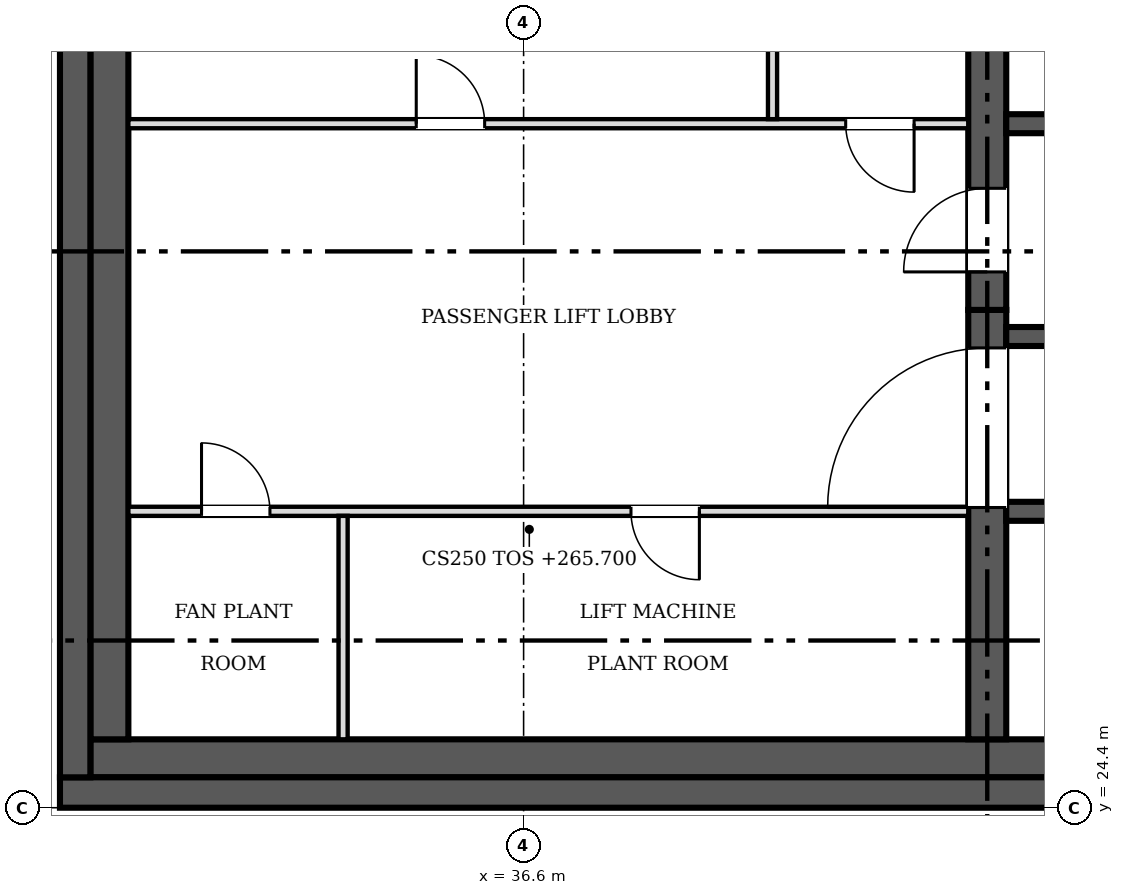
"""IFC4 building model, lengths in metres.
Left out: names, types, materials, properties, quantities, classifications, styles, units other than length and angle.
Written with IfcOpenShell. Run it as: python <this file> out.ifc"""

import sys

from ifc_helpers import new_model, si_unit, direction, frame, frame_2d, origin, place, context, subcontext, project, spatial, rectangle, extrude, source, transform, mapped, element, fill, save


model = new_model("IFC4")
c1 = context("Model", 3, precision=1e-05, world=origin(), true_north=direction((0.0, 1.0)))
c2 = subcontext(c1, "Body", "Model", "MODEL_VIEW")
j1 = project(units=[si_unit("LENGTHUNIT", "METRE"), si_unit("PLANEANGLEUNIT", "RADIAN")], contexts=[c1])
p1 = place(None, origin())
s1 = spatial("IfcSite", under=j1, at=p1, CompositionType="ELEMENT")
p2 = place(p1, origin())
s2 = spatial("IfcBuilding", under=s1, at=p2, CompositionType="ELEMENT")
p3 = place(p2, frame((0.0, 0.0, 265.7)))
s3 = spatial("IfcBuildingStorey", under=s2, at=p3, CompositionType="ELEMENT", Elevation=265.7)
p4 = place(p3, frame((54.9, 24.6, 0.0), z_axis=(0.0, 0.0, 1.0), x_axis=(-1.0, 0.0, 0.0)))
e1 = element("IfcWall", 1, at=p4, inside=s3, PredefinedType="SHEAR", context=c2, shape_type="SweptSolid", body=[
    extrude(rectangle(XDim=24.4, YDim=0.4, at=frame_2d((12.2, 0.0))), origin(), (0.0, 0.0, 1.0), 4.2),
])
p5 = place(p3, frame((30.7, 24.8, 0.0), z_axis=(0.0, 0.0, 1.0), x_axis=(0.0, 1.0, 0.0)))
e2 = element("IfcWall", 2, at=p5, inside=s3, PredefinedType="SHEAR", context=c2, shape_type="SweptSolid", body=[
    extrude(rectangle(XDim=23.6, YDim=0.4, at=frame_2d((11.8, 0.0))), origin(), (0.0, 0.0, 1.0), 4.2),
])
p6 = place(p3, frame((30.9, 25.05, 0.0), z_axis=(0.0, 0.0, 1.0), x_axis=(1.0, 0.0, 0.0)))
e3 = element("IfcWall", 3, at=p6, inside=s3, PredefinedType="SOLIDWALL", context=c2, shape_type="SweptSolid", body=[
    extrude(rectangle(XDim=23.6, YDim=0.5, at=frame_2d((11.8, 0.0))), origin(), (0.0, 0.0, 1.0), 4.2),
])
p7 = place(p3, frame((31.15, 25.3, 0.0), z_axis=(0.0, 0.0, 1.0), x_axis=(0.0, 1.0, 0.0)))
e4 = element("IfcWall", 4, at=p7, inside=s3, PredefinedType="SOLIDWALL", context=c2, shape_type="SweptSolid", body=[
    extrude(rectangle(XDim=22.6, YDim=0.5, at=frame_2d((11.3, 0.0))), origin(), (0.0, 0.0, 1.0), 4.2),
])
p8 = place(p3, frame((42.7, 25.3, 0.0), z_axis=(0.0, 0.0, 1.0), x_axis=(0.0, 1.0, 0.0)))
e5 = element("IfcWall", 5, at=p8, inside=s3, PredefinedType="SHEAR", context=c2, shape_type="SweptSolid", body=[
    extrude(rectangle(XDim=5.65, YDim=0.5, at=frame_2d((2.825, 0.0))), origin(), (0.0, 0.0, 1.0), 4.2),
])
m1 = source(origin(), c2, "Body", "SweptSolid", [
    extrude(rectangle(XDim=2.1, YDim=2.4, at=frame_2d((1.05, 1.2))), frame((0.0, 0.26, 0.0), z_axis=(0.0, -1.0, 0.0), x_axis=(1.0, 0.0, 0.0)), (0.0, 0.0, 1.0), 0.52),
])
p9 = place(p8, frame((3.05, 0.0, 0.0)))
e6 = element("IfcOpeningElement", 6, at=p9, cuts=e5, PredefinedType="OPENING", context=c2, shape_type="MappedRepresentation", body=[
    mapped(m1, transform((0.0, 0.0, 0.0), scale=1.0)),
])
p10 = place(p3, frame((42.7, 36.35, 0.0), z_axis=(0.0, 0.0, 1.0), x_axis=(0.0, -1.0, 0.0)))
e7 = element("IfcWall", 7, at=p10, inside=s3, PredefinedType="SHEAR", context=c2, shape_type="SweptSolid", body=[
    extrude(rectangle(XDim=5.4, YDim=0.5, at=frame_2d((2.7, 0.0))), origin(), (0.0, 0.0, 1.0), 4.2),
])
m2 = source(origin(), c2, "Body", "SweptSolid", [
    extrude(rectangle(XDim=1.1, YDim=2.1, at=frame_2d((0.55, 1.05))), frame((0.0, 0.26, 0.0), z_axis=(0.0, -1.0, 0.0), x_axis=(1.0, 0.0, 0.0)), (0.0, 0.0, 1.0), 0.52),
])
p11 = place(p10, frame((3.8, 0.0, 0.0)))
e8 = element("IfcOpeningElement", 8, at=p11, cuts=e7, PredefinedType="OPENING", context=c2, shape_type="MappedRepresentation", body=[
    mapped(m2, transform((0.0, 0.0, 0.0), scale=1.0)),
])
p12 = place(p3, frame((48.225, 33.4, 0.0), z_axis=(0.0, 0.0, 1.0), x_axis=(-1.0, 0.0, 0.0)))
e9 = element("IfcWall", 9, at=p12, inside=s3, PredefinedType="SOLIDWALL", context=c2, shape_type="SweptSolid", body=[
    extrude(rectangle(XDim=5.275, YDim=0.25, at=frame_2d((2.638, 0.0))), origin(), (0.0, 0.0, 1.0), 4.2),
])
m3 = source(origin(), c2, "Body", "SweptSolid", [
    extrude(rectangle(XDim=1.2, YDim=2.1, at=frame_2d((0.6, 1.05))), frame((0.0, 0.135, 0.0), z_axis=(0.0, -1.0, 0.0), x_axis=(1.0, 0.0, 0.0)), (0.0, 0.0, 1.0), 0.27),
])
p13 = place(p12, frame((3.512, 0.0, 0.0)))
e10 = element("IfcOpeningElement", 10, at=p13, cuts=e9, PredefinedType="OPENING", context=c2, shape_type="MappedRepresentation", body=[
    mapped(m3, transform((0.0, 0.0, 0.0), scale=1.0)),
])
p14 = place(p12, frame((0.688, 0.0, 0.0)))
e11 = element("IfcOpeningElement", 11, at=p14, cuts=e9, PredefinedType="OPENING", context=c2, shape_type="MappedRepresentation", body=[
    mapped(m3, transform((0.0, 0.0, 0.0), scale=1.0)),
])
p15 = place(p3, frame((42.95, 28.3, 0.0), z_axis=(0.0, 0.0, 1.0), x_axis=(1.0, 0.0, 0.0)))
e12 = element("IfcWall", 12, at=p15, inside=s3, PredefinedType="SOLIDWALL", context=c2, shape_type="SweptSolid", body=[
    extrude(rectangle(XDim=5.275, YDim=0.25, at=frame_2d((2.638, 0.0))), origin(), (0.0, 0.0, 1.0), 4.2),
])
m4 = source(origin(), c2, "Body", "SweptSolid", [
    extrude(rectangle(XDim=1.1, YDim=2.1, at=frame_2d((0.55, 1.05))), frame((0.0, 0.135, 0.0), z_axis=(0.0, -1.0, 0.0), x_axis=(1.0, 0.0, 0.0)), (0.0, 0.0, 1.0), 0.27),
])
p16 = place(p15, frame((0.613, 0.0, 0.0)))
e13 = element("IfcOpeningElement", 13, at=p16, cuts=e12, PredefinedType="OPENING", context=c2, shape_type="MappedRepresentation", body=[
    mapped(m4, transform((0.0, 0.0, 0.0), scale=1.0)),
])
p17 = place(p15, frame((3.438, 0.0, 0.0)))
e14 = element("IfcOpeningElement", 14, at=p17, cuts=e12, PredefinedType="OPENING", context=c2, shape_type="MappedRepresentation", body=[
    mapped(m4, transform((0.0, 0.0, 0.0), scale=1.0)),
])
p18 = place(p3, frame((42.95, 30.6, 0.0), z_axis=(0.0, 0.0, 1.0), x_axis=(1.0, 0.0, 0.0)))
e15 = element("IfcWall", 15, at=p18, inside=s3, PredefinedType="SOLIDWALL", context=c2, shape_type="SweptSolid", body=[
    extrude(rectangle(XDim=5.275, YDim=0.25, at=frame_2d((2.638, 0.0))), origin(), (0.0, 0.0, 1.0), 4.2),
])
p19 = place(p3, frame((42.45, 28.3, 0.0), z_axis=(0.0, 0.0, 1.0), x_axis=(-1.0, 0.0, 0.0)))
e16 = element("IfcWall", 16, at=p19, inside=s3, PredefinedType="PARTITIONING", context=c2, shape_type="SweptSolid", body=[
    extrude(rectangle(XDim=11.05, YDim=0.12, at=frame_2d((5.525, 0.0))), origin(), (0.0, 0.0, 1.0), 4.2),
])
m5 = source(origin(), c2, "Body", "SweptSolid", [
    extrude(rectangle(XDim=0.9, YDim=2.1, at=frame_2d((0.45, 1.05))), frame((0.0, 0.07, 0.0), z_axis=(0.0, -1.0, 0.0), x_axis=(1.0, 0.0, 0.0)), (0.0, 0.0, 1.0), 0.14),
])
p20 = place(p19, frame((9.188, 0.0, 0.0)))
e17 = element("IfcOpeningElement", 17, at=p20, cuts=e16, PredefinedType="OPENING", context=c2, shape_type="MappedRepresentation", body=[
    mapped(m5, transform((0.0, 0.0, 0.0), scale=1.0)),
])
p21 = place(p19, frame((3.538, 0.0, 0.0)))
e18 = element("IfcOpeningElement", 18, at=p21, cuts=e16, PredefinedType="OPENING", context=c2, shape_type="MappedRepresentation", body=[
    mapped(m5, transform((0.0, 0.0, 0.0), scale=1.0)),
])
p22 = place(p3, frame((31.4, 33.4, 0.0), z_axis=(0.0, 0.0, 1.0), x_axis=(1.0, 0.0, 0.0)))
e19 = element("IfcWall", 19, at=p22, inside=s3, PredefinedType="PARTITIONING", context=c2, shape_type="SweptSolid", body=[
    extrude(rectangle(XDim=11.05, YDim=0.12, at=frame_2d((5.525, 0.0))), origin(), (0.0, 0.0, 1.0), 4.2),
])
p23 = place(p22, frame((3.788, 0.0, 0.0)))
e20 = element("IfcOpeningElement", 20, at=p23, cuts=e19, PredefinedType="OPENING", context=c2, shape_type="MappedRepresentation", body=[
    mapped(m5, transform((0.0, 0.0, 0.0), scale=1.0)),
])
p24 = place(p22, frame((9.438, 0.0, 0.0)))
e21 = element("IfcOpeningElement", 21, at=p24, cuts=e19, PredefinedType="OPENING", context=c2, shape_type="MappedRepresentation", body=[
    mapped(m5, transform((0.0, 0.0, 0.0), scale=1.0)),
])
p25 = place(p3, frame((39.875, 33.46, 0.0), z_axis=(0.0, 0.0, 1.0), x_axis=(0.0, 1.0, 0.0)))
e22 = element("IfcWall", 22, at=p25, inside=s3, PredefinedType="PARTITIONING", context=c2, shape_type="SweptSolid", body=[
    extrude(rectangle(XDim=2.89, YDim=0.12, at=frame_2d((1.445, 0.0))), origin(), (0.0, 0.0, 1.0), 4.2),
])
p26 = place(p3, frame((34.225, 25.3, 0.0), z_axis=(0.0, 0.0, 1.0), x_axis=(0.0, 1.0, 0.0)))
e23 = element("IfcWall", 23, at=p26, inside=s3, PredefinedType="PARTITIONING", context=c2, shape_type="SweptSolid", body=[
    extrude(rectangle(XDim=2.94, YDim=0.12, at=frame_2d((1.47, 0.0))), origin(), (0.0, 0.0, 1.0), 4.2),
])
m6 = source(origin(), c2, "Body", "SweptSolid", [
    extrude(rectangle(XDim=2.1, YDim=2.4, at=frame_2d((1.05, 1.2))), frame((0.0, 0.025, 0.0), z_axis=(0.0, -1.0, 0.0), x_axis=(1.0, 0.0, 0.0)), (0.0, 0.0, 1.0), 0.05),
])
p27 = place(p9, origin())
e24 = element("IfcDoor", 24, at=p27, inside=s3, OperationType="DOUBLE_DOOR_SINGLE_SWING", PredefinedType="DOOR", context=c2, shape_type="MappedRepresentation", body=[
    mapped(m6, transform((0.0, 0.0, 0.0), scale=1.0)),
])
fill(e6, e24)
m7 = source(origin(), c2, "Body", "SweptSolid", [
    extrude(rectangle(XDim=1.1, YDim=2.1, at=frame_2d((0.55, 1.05))), frame((0.0, 0.025, 0.0), z_axis=(0.0, -1.0, 0.0), x_axis=(1.0, 0.0, 0.0)), (0.0, 0.0, 1.0), 0.05),
])
p28 = place(p11, origin())
e25 = element("IfcDoor", 25, at=p28, inside=s3, OperationType="SINGLE_SWING_RIGHT", PredefinedType="DOOR", context=c2, shape_type="MappedRepresentation", body=[
    mapped(m7, transform((0.0, 0.0, 0.0), scale=1.0)),
])
fill(e8, e25)
m8 = source(origin(), c2, "Body", "SweptSolid", [
    extrude(rectangle(XDim=0.9, YDim=2.1, at=frame_2d((0.45, 1.05))), frame((0.0, 0.025, 0.0), z_axis=(0.0, -1.0, 0.0), x_axis=(1.0, 0.0, 0.0)), (0.0, 0.0, 1.0), 0.05),
])
p29 = place(p20, origin())
e26 = element("IfcDoor", 26, at=p29, inside=s3, OperationType="SINGLE_SWING_RIGHT", PredefinedType="DOOR", context=c2, shape_type="MappedRepresentation", body=[
    mapped(m8, transform((0.0, 0.0, 0.0), scale=1.0)),
])
fill(e17, e26)
p30 = place(p21, origin())
e27 = element("IfcDoor", 27, at=p30, inside=s3, OperationType="SINGLE_SWING_LEFT", PredefinedType="DOOR", context=c2, shape_type="MappedRepresentation", body=[
    mapped(m8, transform((0.0, 0.0, 0.0), scale=1.0)),
])
fill(e18, e27)
p31 = place(p23, origin())
e28 = element("IfcDoor", 28, at=p31, inside=s3, OperationType="SINGLE_SWING_LEFT", PredefinedType="DOOR", context=c2, shape_type="MappedRepresentation", body=[
    mapped(m8, transform((0.0, 0.0, 0.0), scale=1.0)),
])
fill(e20, e28)
p32 = place(p24, origin())
e29 = element("IfcDoor", 29, at=p32, inside=s3, OperationType="SINGLE_SWING_RIGHT", PredefinedType="DOOR", context=c2, shape_type="MappedRepresentation", body=[
    mapped(m8, transform((0.0, 0.0, 0.0), scale=1.0)),
])
fill(e21, e29)
save(model, sys.argv[1])
